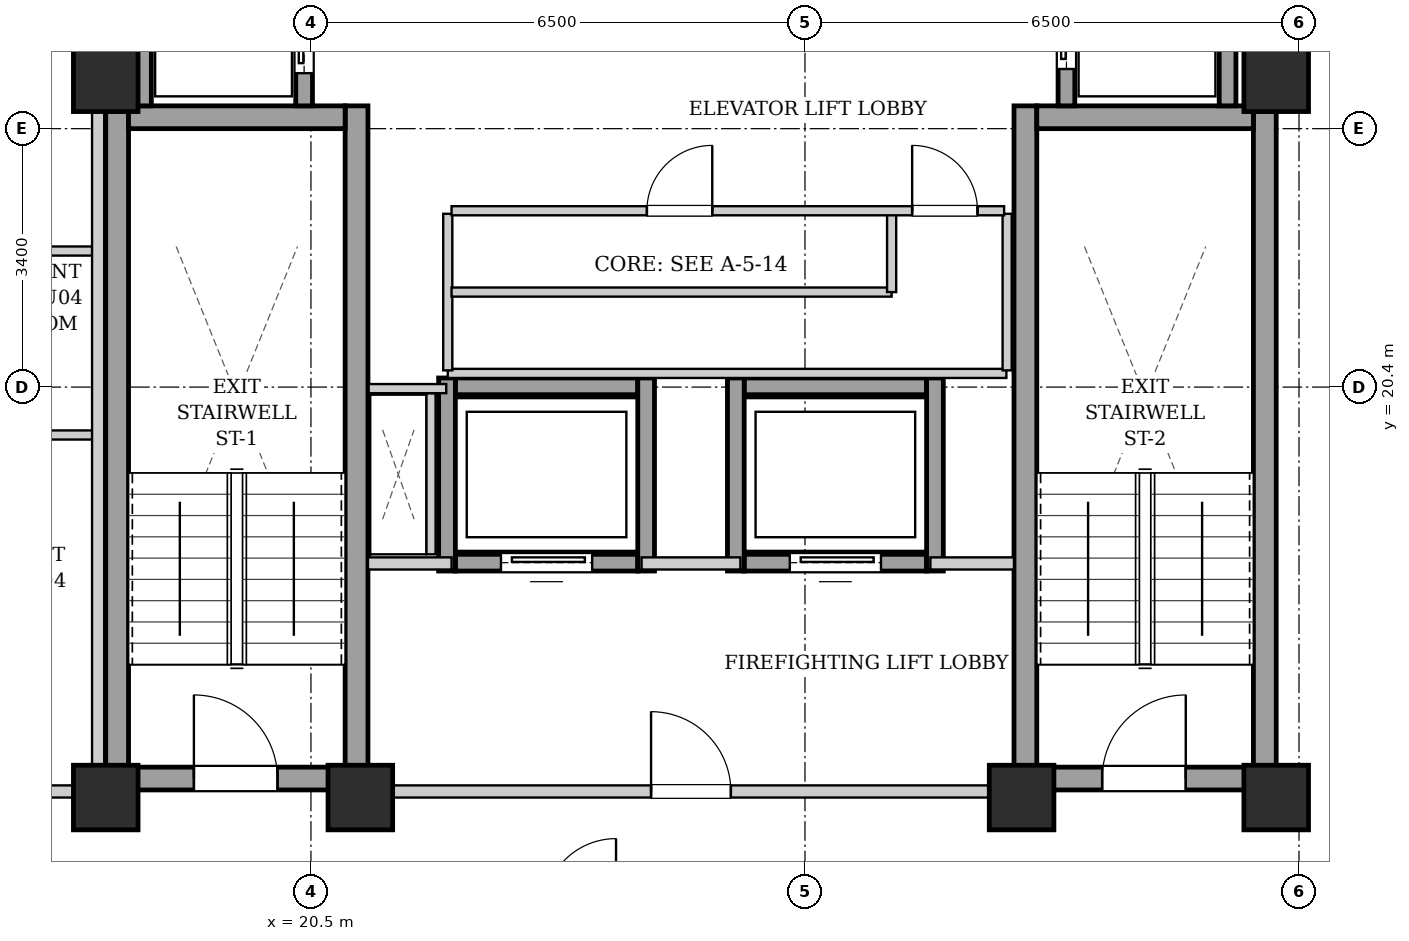
"""IFC4 building model, lengths in metres.
Left out: names, types, materials, properties, quantities, classifications, styles, units other than length and angle.
Written with IfcOpenShell. Run it as: python <this file> out.ifc"""

import sys

from ifc_helpers import new_model, si_unit, direction, frame, frame_2d, origin, origin_2d, place, context, subcontext, project, spatial, rectangle, extrude, element, fill, save


model = new_model("IFC4")
c1 = context("Model", 3, precision=1e-05, world=origin(), true_north=direction((0.0, 1.0)))
c2 = subcontext(c1, "Body", "Model", "MODEL_VIEW")
j1 = project(units=[si_unit("LENGTHUNIT", "METRE"), si_unit("PLANEANGLEUNIT", "RADIAN")], contexts=[c1])
p1 = place(None, origin())
s1 = spatial("IfcSite", under=j1, at=p1, CompositionType="ELEMENT")
p2 = place(p1, origin())
s2 = spatial("IfcBuilding", under=s1, at=p2, CompositionType="ELEMENT")
p3 = place(p2, frame((0.0, 0.0, 197.5)))
s3 = spatial("IfcBuildingStorey", under=s2, at=p3, CompositionType="ELEMENT", Elevation=197.5)
for number, where, z_axis, x_axis in (
    (1, (17.8, 15.0, 0.0), (0.0, 0.0, 1.0), (1.0, 0.0, 0.0)),
    (2, (21.15, 15.0, 0.0), (0.0, 0.0, 1.0), (1.0, 0.0, 0.0)),
    (3, (29.85, 15.0, 0.0), (0.0, 0.0, 1.0), (1.0, 0.0, 0.0)),
    (4, (33.2, 15.0, 0.0), (0.0, 0.0, 1.0), (1.0, 0.0, 0.0)),
    (5, (17.8, 24.45, 0.0), (0.0, 0.0, 1.0), (1.0, 0.0, 0.0)),
    (6, (33.2, 24.45, 0.0), (0.0, 0.0, 1.0), (1.0, 0.0, 0.0)),
):
    element("IfcColumn", number, at=place(p3, frame(where, z_axis=z_axis, x_axis=x_axis)), inside=s3, PredefinedType="COLUMN", context=c2, shape_type="SweptSolid", body=[
        extrude(rectangle(XDim=0.85, YDim=0.85, at=origin_2d()), origin(), (0.0, 0.0, 1.0), 3.3),
    ])
for number, where, z_axis, x_axis in (
    (7, (17.95, 15.1, 0.0), (0.0, 0.0, 1.0), (0.0, 1.0, 0.0)),
    (8, (21.1, 15.1, 0.0), (0.0, 0.0, 1.0), (0.0, 1.0, 0.0)),
):
    element("IfcWall", number, at=place(p3, frame(where, z_axis=z_axis, x_axis=x_axis)), inside=s3, PredefinedType="SHEAR", context=c2, shape_type="SweptSolid", body=[
        extrude(rectangle(XDim=9.0, YDim=0.3, at=frame_2d((4.5, 0.0))), origin(), (0.0, 0.0, 1.0), 3.04),
    ])
p4 = place(p3, frame((18.1, 23.95, 0.0), z_axis=(0.0, 0.0, 1.0), x_axis=(1.0, 0.0, 0.0)))
e9 = element("IfcWall", 9, at=p4, inside=s3, PredefinedType="SHEAR", context=c2, shape_type="SweptSolid", body=[
    extrude(rectangle(XDim=2.85, YDim=0.3, at=frame_2d((1.425, 0.0))), origin(), (0.0, 0.0, 1.0), 3.04),
])
p5 = place(p3, frame((18.1, 15.25, 0.0), z_axis=(0.0, 0.0, 1.0), x_axis=(1.0, 0.0, 0.0)))
e10 = element("IfcWall", 10, at=p5, inside=s3, PredefinedType="SHEAR", context=c2, shape_type="SweptSolid", body=[
    extrude(rectangle(XDim=2.85, YDim=0.3, at=frame_2d((1.425, 0.0))), origin(), (0.0, 0.0, 1.0), 3.04),
])
p6 = place(p5, frame((0.86, 0.0, 0.0)))
e11 = element("IfcOpeningElement", 11, at=p6, cuts=e10, PredefinedType="OPENING", context=c2, shape_type="SweptSolid", body=[
    extrude(rectangle(XDim=1.1, YDim=2.05, at=frame_2d((0.55, 1.025))), frame((0.0, 0.16, 0.0), z_axis=(0.0, -1.0, 0.0), x_axis=(1.0, 0.0, 0.0)), (0.0, 0.0, 1.0), 0.32),
])
for number, where, z_axis, x_axis in (
    (12, (29.9, 15.1, 0.0), (0.0, 0.0, 1.0), (0.0, 1.0, 0.0)),
    (13, (33.05, 15.1, 0.0), (0.0, 0.0, 1.0), (0.0, 1.0, 0.0)),
):
    element("IfcWall", number, at=place(p3, frame(where, z_axis=z_axis, x_axis=x_axis)), inside=s3, PredefinedType="SHEAR", context=c2, shape_type="SweptSolid", body=[
        extrude(rectangle(XDim=9.0, YDim=0.3, at=frame_2d((4.5, 0.0))), origin(), (0.0, 0.0, 1.0), 3.04),
    ])
p7 = place(p3, frame((30.05, 23.95, 0.0), z_axis=(0.0, 0.0, 1.0), x_axis=(1.0, 0.0, 0.0)))
e14 = element("IfcWall", 14, at=p7, inside=s3, PredefinedType="SHEAR", context=c2, shape_type="SweptSolid", body=[
    extrude(rectangle(XDim=2.85, YDim=0.3, at=frame_2d((1.425, 0.0))), origin(), (0.0, 0.0, 1.0), 3.04),
])
p8 = place(p3, frame((30.05, 15.25, 0.0), z_axis=(0.0, 0.0, 1.0), x_axis=(1.0, 0.0, 0.0)))
e15 = element("IfcWall", 15, at=p8, inside=s3, PredefinedType="SHEAR", context=c2, shape_type="SweptSolid", body=[
    extrude(rectangle(XDim=2.85, YDim=0.3, at=frame_2d((1.425, 0.0))), origin(), (0.0, 0.0, 1.0), 3.04),
])
p9 = place(p8, frame((0.86, 0.0, 0.0)))
e16 = element("IfcOpeningElement", 16, at=p9, cuts=e15, PredefinedType="OPENING", context=c2, shape_type="SweptSolid", body=[
    extrude(rectangle(XDim=1.1, YDim=2.05, at=frame_2d((0.55, 1.025))), frame((0.0, 0.16, 0.0), z_axis=(0.0, -1.0, 0.0), x_axis=(1.0, 0.0, 0.0)), (0.0, 0.0, 1.0), 0.32),
])
p10 = place(p3, frame((18.29, 24.1, 0.0), z_axis=(0.0, 0.0, 1.0), x_axis=(0.0, 1.0, 0.0)))
e17 = element("IfcWall", 17, at=p10, inside=s3, PredefinedType="SHEAR", context=c2, shape_type="SweptSolid", body=[
    extrude(rectangle(XDim=4.14, YDim=0.22, at=frame_2d((2.07, 0.0))), origin(), (0.0, 0.0, 1.0), 3.04),
])
p11 = place(p3, frame((20.41, 24.1, 0.0), z_axis=(0.0, 0.0, 1.0), x_axis=(0.0, 1.0, 0.0)))
e18 = element("IfcWall", 18, at=p11, inside=s3, PredefinedType="SHEAR", context=c2, shape_type="SweptSolid", body=[
    extrude(rectangle(XDim=1.96, YDim=0.22, at=frame_2d((0.98, 0.0))), origin(), (0.0, 0.0, 1.0), 3.04),
])
p12 = place(p11, frame((0.43, 0.0, 0.0)))
e19 = element("IfcOpeningElement", 19, at=p12, cuts=e18, PredefinedType="OPENING", context=c2, shape_type="SweptSolid", body=[
    extrude(rectangle(XDim=1.1, YDim=2.15, at=frame_2d((0.55, 1.075))), frame((0.0, 0.12, 0.0), z_axis=(0.0, -1.0, 0.0), x_axis=(1.0, 0.0, 0.0)), (0.0, 0.0, 1.0), 0.24),
])
p13 = place(p3, frame((30.44, 24.1, 0.0), z_axis=(0.0, 0.0, 1.0), x_axis=(0.0, 1.0, 0.0)))
e20 = element("IfcWall", 20, at=p13, inside=s3, PredefinedType="SHEAR", context=c2, shape_type="SweptSolid", body=[
    extrude(rectangle(XDim=2.07, YDim=0.22, at=frame_2d((1.035, 0.0))), origin(), (0.0, 0.0, 1.0), 3.04),
])
p14 = place(p13, frame((0.485, 0.0, 0.0)))
e21 = element("IfcOpeningElement", 21, at=p14, cuts=e20, PredefinedType="OPENING", context=c2, shape_type="SweptSolid", body=[
    extrude(rectangle(XDim=1.1, YDim=2.15, at=frame_2d((0.55, 1.075))), frame((0.0, 0.12, 0.0), z_axis=(0.0, -1.0, 0.0), x_axis=(1.0, 0.0, 0.0)), (0.0, 0.0, 1.0), 0.24),
])
p15 = place(p3, frame((32.56, 24.1, 0.0), z_axis=(0.0, 0.0, 1.0), x_axis=(0.0, 1.0, 0.0)))
e22 = element("IfcWall", 22, at=p15, inside=s3, PredefinedType="SHEAR", context=c2, shape_type="SweptSolid", body=[
    extrude(rectangle(XDim=2.07, YDim=0.22, at=frame_2d((1.035, 0.0))), origin(), (0.0, 0.0, 1.0), 3.04),
])
p16 = place(p3, frame((22.4, 18.09, 0.0), z_axis=(0.0, 0.0, 1.0), x_axis=(1.0, 0.0, 0.0)))
e23 = element("IfcWall", 23, at=p16, inside=s3, PredefinedType="SHEAR", context=c2, shape_type="SweptSolid", body=[
    extrude(rectangle(XDim=2.4, YDim=0.22, at=frame_2d((1.2, 0.0))), origin(), (0.0, 0.0, 1.0), 3.04),
])
p17 = place(p16, frame((0.6, 0.0, 0.0)))
e24 = element("IfcOpeningElement", 24, at=p17, cuts=e23, PredefinedType="OPENING", context=c2, shape_type="SweptSolid", body=[
    extrude(rectangle(XDim=1.2, YDim=2.15, at=frame_2d((0.6, 1.075))), frame((0.0, 0.12, 0.0), z_axis=(0.0, -1.0, 0.0), x_axis=(1.0, 0.0, 0.0)), (0.0, 0.0, 1.0), 0.24),
])
p18 = place(p3, frame((22.4, 20.41, 0.0), z_axis=(0.0, 0.0, 1.0), x_axis=(1.0, 0.0, 0.0)))
e25 = element("IfcWall", 25, at=p18, inside=s3, PredefinedType="SHEAR", context=c2, shape_type="SweptSolid", body=[
    extrude(rectangle(XDim=2.4, YDim=0.22, at=frame_2d((1.2, 0.0))), origin(), (0.0, 0.0, 1.0), 3.04),
])
for number, where, z_axis, x_axis in (
    (26, (22.29, 17.98, 0.0), (0.0, 0.0, 1.0), (0.0, 1.0, 0.0)),
    (27, (24.91, 17.98, 0.0), (0.0, 0.0, 1.0), (0.0, 1.0, 0.0)),
):
    element("IfcWall", number, at=place(p3, frame(where, z_axis=z_axis, x_axis=x_axis)), inside=s3, PredefinedType="SHEAR", context=c2, shape_type="SweptSolid", body=[
        extrude(rectangle(XDim=2.54, YDim=0.22, at=frame_2d((1.27, 0.0))), origin(), (0.0, 0.0, 1.0), 3.04),
    ])
p19 = place(p3, frame((26.2, 18.09, 0.0), z_axis=(0.0, 0.0, 1.0), x_axis=(1.0, 0.0, 0.0)))
e28 = element("IfcWall", 28, at=p19, inside=s3, PredefinedType="SHEAR", context=c2, shape_type="SweptSolid", body=[
    extrude(rectangle(XDim=2.4, YDim=0.22, at=frame_2d((1.2, 0.0))), origin(), (0.0, 0.0, 1.0), 3.04),
])
p20 = place(p19, frame((0.6, 0.0, 0.0)))
e29 = element("IfcOpeningElement", 29, at=p20, cuts=e28, PredefinedType="OPENING", context=c2, shape_type="SweptSolid", body=[
    extrude(rectangle(XDim=1.2, YDim=2.15, at=frame_2d((0.6, 1.075))), frame((0.0, 0.12, 0.0), z_axis=(0.0, -1.0, 0.0), x_axis=(1.0, 0.0, 0.0)), (0.0, 0.0, 1.0), 0.24),
])
p21 = place(p3, frame((26.2, 20.41, 0.0), z_axis=(0.0, 0.0, 1.0), x_axis=(1.0, 0.0, 0.0)))
e30 = element("IfcWall", 30, at=p21, inside=s3, PredefinedType="SHEAR", context=c2, shape_type="SweptSolid", body=[
    extrude(rectangle(XDim=2.4, YDim=0.22, at=frame_2d((1.2, 0.0))), origin(), (0.0, 0.0, 1.0), 3.04),
])
for number, where, z_axis, x_axis in (
    (31, (26.09, 17.98, 0.0), (0.0, 0.0, 1.0), (0.0, 1.0, 0.0)),
    (32, (28.71, 17.98, 0.0), (0.0, 0.0, 1.0), (0.0, 1.0, 0.0)),
):
    element("IfcWall", number, at=place(p3, frame(where, z_axis=z_axis, x_axis=x_axis)), inside=s3, PredefinedType="SHEAR", context=c2, shape_type="SweptSolid", body=[
        extrude(rectangle(XDim=2.54, YDim=0.22, at=frame_2d((1.27, 0.0))), origin(), (0.0, 0.0, 1.0), 3.04),
    ])
p22 = place(p3, frame((21.25, 15.08, 0.0), z_axis=(0.0, 0.0, 1.0), x_axis=(1.0, 0.0, 0.0)))
e33 = element("IfcWall", 33, at=p22, inside=s3, PredefinedType="PARTITIONING", context=c2, shape_type="SweptSolid", body=[
    extrude(rectangle(XDim=8.5, YDim=0.16, at=frame_2d((4.25, 0.0))), origin(), (0.0, 0.0, 1.0), 2.556),
])
p23 = place(p22, frame((3.725, 0.0, 0.0)))
e34 = element("IfcOpeningElement", 34, at=p23, cuts=e33, PredefinedType="OPENING", context=c2, shape_type="SweptSolid", body=[
    extrude(rectangle(XDim=1.05, YDim=2.05, at=frame_2d((0.525, 1.025))), frame((0.0, 0.09, 0.0), z_axis=(0.0, -1.0, 0.0), x_axis=(1.0, 0.0, 0.0)), (0.0, 0.0, 1.0), 0.18),
])
p24 = place(p3, frame((21.25, 18.08, 0.0), z_axis=(0.0, 0.0, 1.0), x_axis=(1.0, 0.0, 0.0)))
e35 = element("IfcWall", 35, at=p24, inside=s3, PredefinedType="PARTITIONING", context=c2, shape_type="SweptSolid", body=[
    extrude(rectangle(XDim=1.1, YDim=0.16, at=frame_2d((0.55, 0.0))), origin(), (0.0, 0.0, 1.0), 3.04),
])
p25 = place(p3, frame((24.85, 18.08, 0.0), z_axis=(0.0, 0.0, 1.0), x_axis=(1.0, 0.0, 0.0)))
e36 = element("IfcWall", 36, at=p25, inside=s3, PredefinedType="PARTITIONING", context=c2, shape_type="SweptSolid", body=[
    extrude(rectangle(XDim=1.3, YDim=0.16, at=frame_2d((0.65, 0.0))), origin(), (0.0, 0.0, 1.0), 3.04),
])
p26 = place(p3, frame((28.65, 18.08, 0.0), z_axis=(0.0, 0.0, 1.0), x_axis=(1.0, 0.0, 0.0)))
e37 = element("IfcWall", 37, at=p26, inside=s3, PredefinedType="PARTITIONING", context=c2, shape_type="SweptSolid", body=[
    extrude(rectangle(XDim=1.1, YDim=0.16, at=frame_2d((0.55, 0.0))), origin(), (0.0, 0.0, 1.0), 3.04),
])
for number, where, z_axis, x_axis in (
    (38, (17.88, 24.12, 0.0), (0.0, 0.0, 1.0), (0.0, 1.0, 0.0)),
    (39, (33.12, 24.12, 0.0), (0.0, 0.0, 1.0), (0.0, 1.0, 0.0)),
):
    element("IfcWall", number, at=place(p3, frame(where, z_axis=z_axis, x_axis=x_axis)), inside=s3, PredefinedType="PARTITIONING", context=c2, shape_type="SweptSolid", body=[
        extrude(rectangle(XDim=4.76, YDim=0.16, at=frame_2d((2.38, 0.0))), origin(), (0.0, 0.0, 1.0), 2.375),
    ])
p27 = place(p3, frame((22.08, 18.2, 0.0), z_axis=(0.0, 0.0, 1.0), x_axis=(0.0, 1.0, 0.0)))
e40 = element("IfcWall", 40, at=p27, inside=s3, PredefinedType="PARTITIONING", context=c2, shape_type="SweptSolid", body=[
    extrude(rectangle(XDim=2.12, YDim=0.12, at=frame_2d((1.06, 0.0))), origin(), (0.0, 0.0, 1.0), 3.04),
])
p28 = place(p3, frame((22.28, 20.38, 0.0), z_axis=(0.0, 0.0, 1.0), x_axis=(-1.0, 0.0, 0.0)))
e41 = element("IfcWall", 41, at=p28, inside=s3, PredefinedType="PARTITIONING", context=c2, shape_type="SweptSolid", body=[
    extrude(rectangle(XDim=1.02, YDim=0.12, at=frame_2d((0.51, 0.0))), origin(), (0.0, 0.0, 1.0), 3.04),
])
p29 = place(p3, frame((22.3, 20.58, 0.0), z_axis=(0.0, 0.0, 1.0), x_axis=(1.0, 0.0, 0.0)))
e42 = element("IfcWall", 42, at=p29, inside=s3, PredefinedType="PARTITIONING", context=c2, shape_type="SweptSolid", body=[
    extrude(rectangle(XDim=7.35, YDim=0.12, at=frame_2d((3.675, 0.0))), origin(), (0.0, 0.0, 1.0), 3.04),
])
for number, where, z_axis, x_axis in (
    (43, (22.3, 20.62, 0.0), (0.0, 0.0, 1.0), (0.0, 1.0, 0.0)),
    (44, (29.66, 20.62, 0.0), (0.0, 0.0, 1.0), (0.0, 1.0, 0.0)),
):
    element("IfcWall", number, at=place(p3, frame(where, z_axis=z_axis, x_axis=x_axis)), inside=s3, PredefinedType="PARTITIONING", context=c2, shape_type="SweptSolid", body=[
        extrude(rectangle(XDim=2.06, YDim=0.12, at=frame_2d((1.03, 0.0))), origin(), (0.0, 0.0, 1.0), 3.04),
    ])
p30 = place(p3, frame((22.35, 21.65, 0.0), z_axis=(0.0, 0.0, 1.0), x_axis=(1.0, 0.0, 0.0)))
e45 = element("IfcWall", 45, at=p30, inside=s3, PredefinedType="PARTITIONING", context=c2, shape_type="SweptSolid", body=[
    extrude(rectangle(XDim=5.79, YDim=0.12, at=frame_2d((2.895, 0.0))), origin(), (0.0, 0.0, 1.0), 3.04),
])
p31 = place(p3, frame((28.14, 21.65, 0.0), z_axis=(0.0, 0.0, 1.0), x_axis=(0.0, 1.0, 0.0)))
e46 = element("IfcWall", 46, at=p31, inside=s3, PredefinedType="PARTITIONING", context=c2, shape_type="SweptSolid", body=[
    extrude(rectangle(XDim=1.03, YDim=0.12, at=frame_2d((0.515, 0.0))), origin(), (0.0, 0.0, 1.0), 3.04),
])
p32 = place(p3, frame((22.35, 22.72, 0.0), z_axis=(0.0, 0.0, 1.0), x_axis=(1.0, 0.0, 0.0)))
e47 = element("IfcWall", 47, at=p32, inside=s3, PredefinedType="PARTITIONING", context=c2, shape_type="SweptSolid", body=[
    extrude(rectangle(XDim=7.27, YDim=0.12, at=frame_2d((3.635, 0.0))), origin(), (0.0, 0.0, 1.0), 3.04),
])
p33 = place(p32, frame((2.57, 0.0, 0.0)))
e48 = element("IfcOpeningElement", 48, at=p33, cuts=e47, PredefinedType="OPENING", context=c2, shape_type="SweptSolid", body=[
    extrude(rectangle(XDim=0.86, YDim=2.05, at=frame_2d((0.43, 1.025))), frame((0.0, 0.07, 0.0), z_axis=(0.0, -1.0, 0.0), x_axis=(1.0, 0.0, 0.0)), (0.0, 0.0, 1.0), 0.14),
])
p34 = place(p32, frame((6.06, 0.0, 0.0)))
e49 = element("IfcOpeningElement", 49, at=p34, cuts=e47, PredefinedType="OPENING", context=c2, shape_type="SweptSolid", body=[
    extrude(rectangle(XDim=0.86, YDim=2.05, at=frame_2d((0.43, 1.025))), frame((0.0, 0.07, 0.0), z_axis=(0.0, -1.0, 0.0), x_axis=(1.0, 0.0, 0.0)), (0.0, 0.0, 1.0), 0.14),
])
p35 = place(p3, frame((10.88, 15.08, 0.0), z_axis=(0.0, 0.0, 1.0), x_axis=(1.0, 0.0, 0.0)))
e50 = element("IfcWall", 50, at=p35, inside=s3, PredefinedType="PARTITIONING", context=c2, shape_type="SweptSolid", body=[
    extrude(rectangle(XDim=6.88, YDim=0.16, at=frame_2d((3.44, 0.0))), origin(), (0.0, 0.0, 1.0), 2.556),
])
p36 = place(p35, frame((5.06, 0.0, 0.0)))
e51 = element("IfcOpeningElement", 51, at=p36, cuts=e50, PredefinedType="OPENING", context=c2, shape_type="SweptSolid", body=[
    extrude(rectangle(XDim=0.95, YDim=2.1, at=frame_2d((0.475, 1.05))), frame((0.0, 0.09, 0.0), z_axis=(0.0, -1.0, 0.0), x_axis=(1.0, 0.0, 0.0)), (0.0, 0.0, 1.0), 0.18),
])
p37 = place(p3, frame((15.19, 22.19, 0.0), z_axis=(0.0, 0.0, 1.0), x_axis=(1.0, 0.0, 0.0)))
e52 = element("IfcWall", 52, at=p37, inside=s3, PredefinedType="PARTITIONING", context=c2, shape_type="SweptSolid", body=[
    extrude(rectangle(XDim=2.45, YDim=0.12, at=frame_2d((1.225, 0.0))), origin(), (0.0, 0.0, 1.0), 3.04),
])
p38 = place(p3, frame((15.19, 19.77, 0.0), z_axis=(0.0, 0.0, 1.0), x_axis=(1.0, 0.0, 0.0)))
e53 = element("IfcWall", 53, at=p38, inside=s3, PredefinedType="PARTITIONING", context=c2, shape_type="SweptSolid", body=[
    extrude(rectangle(XDim=2.45, YDim=0.12, at=frame_2d((1.225, 0.0))), origin(), (0.0, 0.0, 1.0), 3.04),
])
p39 = place(p38, frame((0.795, 0.0, 0.0)))
e54 = element("IfcOpeningElement", 54, at=p39, cuts=e53, PredefinedType="OPENING", context=c2, shape_type="SweptSolid", body=[
    extrude(rectangle(XDim=0.86, YDim=2.05, at=frame_2d((0.43, 1.025))), frame((0.0, 0.07, 0.0), z_axis=(0.0, -1.0, 0.0), x_axis=(1.0, 0.0, 0.0)), (0.0, 0.0, 1.0), 0.14),
])
p40 = place(p3, frame((17.7, 15.02, 0.0), z_axis=(0.0, 0.0, 1.0), x_axis=(0.0, 1.0, 0.0)))
e55 = element("IfcWall", 55, at=p40, inside=s3, PredefinedType="PARTITIONING", context=c2, shape_type="SweptSolid", body=[
    extrude(rectangle(XDim=13.98, YDim=0.16, at=frame_2d((6.99, 0.0))), origin(), (0.0, 0.0, 1.0), 2.375),
])
p41 = place(p6, origin())
e56 = element("IfcDoor", 56, at=p41, inside=s3, OperationType="SINGLE_SWING_LEFT", PredefinedType="DOOR", context=c2, shape_type="SweptSolid", body=[
    extrude(rectangle(XDim=1.1, YDim=2.05, at=frame_2d((0.55, 1.025))), frame((0.0, 0.025, 0.0), z_axis=(0.0, -1.0, 0.0), x_axis=(1.0, 0.0, 0.0)), (0.0, 0.0, 1.0), 0.05),
])
fill(e11, e56)
p42 = place(p9, origin())
e57 = element("IfcDoor", 57, at=p42, inside=s3, OperationType="SINGLE_SWING_RIGHT", PredefinedType="DOOR", context=c2, shape_type="SweptSolid", body=[
    extrude(rectangle(XDim=1.1, YDim=2.05, at=frame_2d((0.55, 1.025))), frame((0.0, 0.025, 0.0), z_axis=(0.0, -1.0, 0.0), x_axis=(1.0, 0.0, 0.0)), (0.0, 0.0, 1.0), 0.05),
])
fill(e16, e57)
p43 = place(p12, origin())
e58 = element("IfcDoor", 58, at=p43, inside=s3, OperationType="SLIDING_TO_LEFT", PredefinedType="DOOR", context=c2, shape_type="SweptSolid", body=[
    extrude(rectangle(XDim=1.1, YDim=2.15, at=frame_2d((0.55, 1.075))), frame((0.0, 0.025, 0.0), z_axis=(0.0, -1.0, 0.0), x_axis=(1.0, 0.0, 0.0)), (0.0, 0.0, 1.0), 0.05),
])
fill(e19, e58)
p44 = place(p14, origin())
e59 = element("IfcDoor", 59, at=p44, inside=s3, OperationType="SLIDING_TO_LEFT", PredefinedType="DOOR", context=c2, shape_type="SweptSolid", body=[
    extrude(rectangle(XDim=1.1, YDim=2.15, at=frame_2d((0.55, 1.075))), frame((0.0, 0.025, 0.0), z_axis=(0.0, -1.0, 0.0), x_axis=(1.0, 0.0, 0.0)), (0.0, 0.0, 1.0), 0.05),
])
fill(e21, e59)
p45 = place(p17, origin())
e60 = element("IfcDoor", 60, at=p45, inside=s3, OperationType="SLIDING_TO_LEFT", PredefinedType="DOOR", context=c2, shape_type="SweptSolid", body=[
    extrude(rectangle(XDim=1.2, YDim=2.15, at=frame_2d((0.6, 1.075))), frame((0.0, 0.025, 0.0), z_axis=(0.0, -1.0, 0.0), x_axis=(1.0, 0.0, 0.0)), (0.0, 0.0, 1.0), 0.05),
])
fill(e24, e60)
p46 = place(p20, origin())
e61 = element("IfcDoor", 61, at=p46, inside=s3, OperationType="SLIDING_TO_LEFT", PredefinedType="DOOR", context=c2, shape_type="SweptSolid", body=[
    extrude(rectangle(XDim=1.2, YDim=2.15, at=frame_2d((0.6, 1.075))), frame((0.0, 0.025, 0.0), z_axis=(0.0, -1.0, 0.0), x_axis=(1.0, 0.0, 0.0)), (0.0, 0.0, 1.0), 0.05),
])
fill(e29, e61)
p47 = place(p23, origin())
e62 = element("IfcDoor", 62, at=p47, inside=s3, OperationType="SINGLE_SWING_LEFT", PredefinedType="DOOR", context=c2, shape_type="SweptSolid", body=[
    extrude(rectangle(XDim=1.05, YDim=2.05, at=frame_2d((0.525, 1.025))), frame((0.0, 0.025, 0.0), z_axis=(0.0, -1.0, 0.0), x_axis=(1.0, 0.0, 0.0)), (0.0, 0.0, 1.0), 0.05),
])
fill(e34, e62)
p48 = place(p33, origin())
e63 = element("IfcDoor", 63, at=p48, inside=s3, OperationType="SINGLE_SWING_RIGHT", PredefinedType="DOOR", context=c2, shape_type="SweptSolid", body=[
    extrude(rectangle(XDim=0.86, YDim=2.05, at=frame_2d((0.43, 1.025))), frame((0.0, 0.025, 0.0), z_axis=(0.0, -1.0, 0.0), x_axis=(1.0, 0.0, 0.0)), (0.0, 0.0, 1.0), 0.05),
])
fill(e48, e63)
p49 = place(p34, origin())
e64 = element("IfcDoor", 64, at=p49, inside=s3, OperationType="SINGLE_SWING_LEFT", PredefinedType="DOOR", context=c2, shape_type="SweptSolid", body=[
    extrude(rectangle(XDim=0.86, YDim=2.05, at=frame_2d((0.43, 1.025))), frame((0.0, 0.025, 0.0), z_axis=(0.0, -1.0, 0.0), x_axis=(1.0, 0.0, 0.0)), (0.0, 0.0, 1.0), 0.05),
])
fill(e49, e64)
save(model, sys.argv[1])
